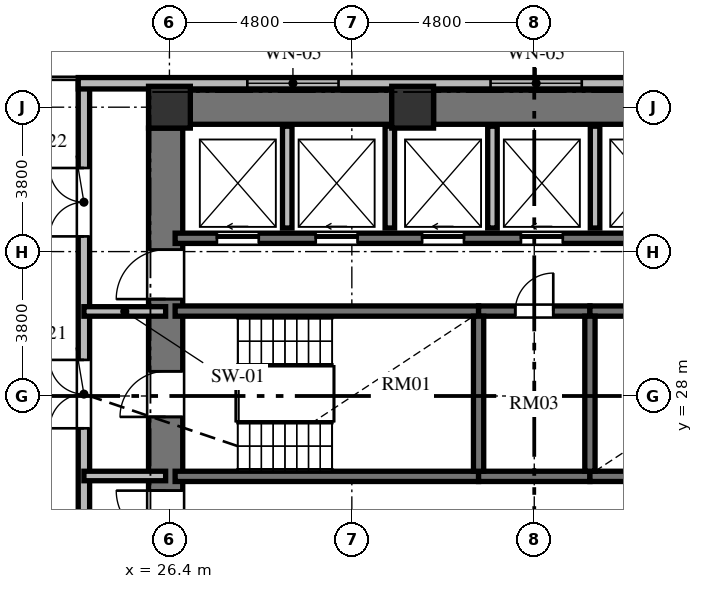
"""IFC4 building model, lengths in metres.
Left out: names, types, materials, properties, quantities, classifications, styles, units other than length and angle.
Written with IfcOpenShell. Run it as: python <this file> out.ifc"""

import sys

from ifc_helpers import new_model, si_unit, direction, frame, frame_2d, origin, origin_2d, place, context, subcontext, project, spatial, rectangle, extrude, element, fill, save


model = new_model("IFC4")
c1 = context("Model", 3, precision=1e-05, world=origin(), true_north=direction((0.0, 1.0)))
c2 = subcontext(c1, "Body", "Model", "MODEL_VIEW")
j1 = project(units=[si_unit("LENGTHUNIT", "METRE"), si_unit("PLANEANGLEUNIT", "RADIAN")], contexts=[c1])
p1 = place(None, origin())
s1 = spatial("IfcSite", under=j1, at=p1, CompositionType="ELEMENT")
p2 = place(p1, origin())
s2 = spatial("IfcBuilding", under=s1, at=p2, CompositionType="ELEMENT")
p3 = place(p2, origin())
s3 = spatial("IfcBuildingStorey", under=s2, at=p3, CompositionType="ELEMENT", Elevation=0.0)
for number, where, z_axis, x_axis in (
    (1, (32.8, 35.6, 0.0), (0.0, 0.0, 1.0), (1.0, 0.0, 0.0)),
    (2, (26.4, 35.6, 0.0), (0.0, 0.0, 1.0), (1.0, 0.0, 0.0)),
):
    element("IfcColumn", number, at=place(p3, frame(where, z_axis=z_axis, x_axis=x_axis)), inside=s3, PredefinedType="COLUMN", context=c2, shape_type="SweptSolid", body=[
        extrude(rectangle(XDim=1.1, YDim=1.1, at=origin_2d()), origin(), (0.0, 0.0, 1.0), 6.0),
    ])
p4 = place(p3, frame((26.3, 20.95, 0.0), z_axis=(0.0, 0.0, 1.0), x_axis=(0.0, 1.0, 0.0)))
e3 = element("IfcWall", 3, at=p4, inside=s3, PredefinedType="SHEAR", context=c2, shape_type="SweptSolid", body=[
    extrude(rectangle(XDim=14.1, YDim=0.9, at=frame_2d((7.05, 0.0))), origin(), (0.0, 0.0, 1.0), 6.0),
])
p5 = place(p4, frame((6.5, 0.0, 0.0)))
e4 = element("IfcOpeningElement", 4, at=p5, cuts=e3, PredefinedType="OPENING", context=c2, shape_type="SweptSolid", body=[
    extrude(rectangle(XDim=1.2, YDim=2.15, at=frame_2d((0.6, 1.075))), frame((0.0, 0.46, 0.0), z_axis=(0.0, -1.0, 0.0), x_axis=(1.0, 0.0, 0.0)), (0.0, 0.0, 1.0), 0.92),
])
p6 = place(p4, frame((9.6, 0.0, 0.0)))
e5 = element("IfcOpeningElement", 5, at=p6, cuts=e3, PredefinedType="OPENING", context=c2, shape_type="SweptSolid", body=[
    extrude(rectangle(XDim=1.3, YDim=2.2, at=frame_2d((0.65, 1.1))), frame((0.0, 0.46, 0.0), z_axis=(0.0, -1.0, 0.0), x_axis=(1.0, 0.0, 0.0)), (0.0, 0.0, 1.0), 0.92),
])
p7 = place(p4, frame((3.26, 0.0, 0.0)))
e6 = element("IfcOpeningElement", 6, at=p7, cuts=e3, PredefinedType="OPENING", context=c2, shape_type="SweptSolid", body=[
    extrude(rectangle(XDim=1.3, YDim=2.2, at=frame_2d((0.65, 1.1))), frame((0.0, 0.46, 0.0), z_axis=(0.0, -1.0, 0.0), x_axis=(1.0, 0.0, 0.0)), (0.0, 0.0, 1.0), 0.92),
])
p8 = place(p3, frame((26.95, 35.6, 0.0), z_axis=(0.0, 0.0, 1.0), x_axis=(1.0, 0.0, 0.0)))
e7 = element("IfcWall", 7, at=p8, inside=s3, PredefinedType="SHEAR", context=c2, shape_type="SweptSolid", body=[
    extrude(rectangle(XDim=5.3, YDim=0.9, at=frame_2d((2.65, 0.0))), origin(), (0.0, 0.0, 1.0), 6.0),
])
p9 = place(p3, frame((33.35, 35.6, 0.0), z_axis=(0.0, 0.0, 1.0), x_axis=(1.0, 0.0, 0.0)))
e8 = element("IfcWall", 8, at=p9, inside=s3, PredefinedType="SHEAR", context=c2, shape_type="SweptSolid", body=[
    extrude(rectangle(XDim=5.3, YDim=0.9, at=frame_2d((2.65, 0.0))), origin(), (0.0, 0.0, 1.0), 6.0),
])
p10 = place(p3, frame((24.15, 13.75, 0.0), z_axis=(0.0, 0.0, 1.0), x_axis=(0.0, 1.0, 0.0)))
e9 = element("IfcWall", 9, at=p10, inside=s3, PredefinedType="SOLIDWALL", context=c2, shape_type="SweptSolid", body=[
    extrude(rectangle(XDim=22.48, YDim=0.3, at=frame_2d((11.24, 0.0))), origin(), (0.0, 0.0, 1.0), 5.72),
])
p11 = place(p10, frame((8.15, 0.0, 0.0)))
e10 = element("IfcOpeningElement", 10, at=p11, cuts=e9, PredefinedType="OPENING", context=c2, shape_type="SweptSolid", body=[
    extrude(rectangle(XDim=1.8, YDim=2.4, at=frame_2d((0.9, 1.2))), frame((0.0, 0.16, 0.0), z_axis=(0.0, -1.0, 0.0), x_axis=(1.0, 0.0, 0.0)), (0.0, 0.0, 1.0), 0.32),
])
p12 = place(p10, frame((13.4, 0.0, 0.0)))
e11 = element("IfcOpeningElement", 11, at=p12, cuts=e9, PredefinedType="OPENING", context=c2, shape_type="SweptSolid", body=[
    extrude(rectangle(XDim=1.8, YDim=2.4, at=frame_2d((0.9, 1.2))), frame((0.0, 0.16, 0.0), z_axis=(0.0, -1.0, 0.0), x_axis=(1.0, 0.0, 0.0)), (0.0, 0.0, 1.0), 0.32),
])
p13 = place(p10, frame((18.45, 0.0, 0.0)))
e12 = element("IfcOpeningElement", 12, at=p13, cuts=e9, PredefinedType="OPENING", context=c2, shape_type="SweptSolid", body=[
    extrude(rectangle(XDim=1.8, YDim=2.4, at=frame_2d((0.9, 1.2))), frame((0.0, 0.16, 0.0), z_axis=(0.0, -1.0, 0.0), x_axis=(1.0, 0.0, 0.0)), (0.0, 0.0, 1.0), 0.32),
])
p14 = place(p3, frame((24.0, 36.23, 0.0), z_axis=(0.0, 0.0, 1.0), x_axis=(1.0, 0.0, 0.0)))
e13 = element("IfcWall", 13, at=p14, inside=s3, PredefinedType="SOLIDWALL", context=c2, shape_type="SweptSolid", body=[
    extrude(rectangle(XDim=21.95, YDim=0.3, at=frame_2d((10.975, 0.0))), origin(), (0.0, 0.0, 1.0), 5.72),
])
p15 = place(p14, frame((4.45, 0.0, 0.9)))
e14 = element("IfcOpeningElement", 14, at=p15, cuts=e13, PredefinedType="OPENING", context=c2, shape_type="SweptSolid", body=[
    extrude(rectangle(XDim=2.4, YDim=3.0, at=frame_2d((1.2, 1.5))), frame((0.0, 0.16, 0.0), z_axis=(0.0, -1.0, 0.0), x_axis=(1.0, 0.0, 0.0)), (0.0, 0.0, 1.0), 0.32),
])
p16 = place(p14, frame((10.85, 0.0, 0.9)))
e15 = element("IfcOpeningElement", 15, at=p16, cuts=e13, PredefinedType="OPENING", context=c2, shape_type="SweptSolid", body=[
    extrude(rectangle(XDim=2.4, YDim=3.0, at=frame_2d((1.2, 1.5))), frame((0.0, 0.16, 0.0), z_axis=(0.0, -1.0, 0.0), x_axis=(1.0, 0.0, 0.0)), (0.0, 0.0, 1.0), 0.32),
])
p17 = place(p14, frame((17.25, 0.0, 0.9)))
e16 = element("IfcOpeningElement", 16, at=p17, cuts=e13, PredefinedType="OPENING", context=c2, shape_type="SweptSolid", body=[
    extrude(rectangle(XDim=2.4, YDim=3.0, at=frame_2d((1.2, 1.5))), frame((0.0, 0.16, 0.0), z_axis=(0.0, -1.0, 0.0), x_axis=(1.0, 0.0, 0.0)), (0.0, 0.0, 1.0), 0.32),
])
p18 = place(p3, frame((26.55, 30.235, 0.0), z_axis=(0.0, 0.0, 1.0), x_axis=(1.0, 0.0, 0.0)))
e17 = element("IfcWall", 17, at=p18, inside=s3, PredefinedType="SHEAR", context=c2, shape_type="SweptSolid", body=[
    extrude(rectangle(XDim=7.985, YDim=0.27, at=frame_2d((3.992, 0.0))), origin(), (0.0, 0.0, 1.0), 6.0),
])
p19 = place(p3, frame((34.535, 30.235, 0.0), z_axis=(0.0, 0.0, 1.0), x_axis=(1.0, 0.0, 0.0)))
e18 = element("IfcWall", 18, at=p19, inside=s3, PredefinedType="SHEAR", context=c2, shape_type="SweptSolid", body=[
    extrude(rectangle(XDim=2.93, YDim=0.27, at=frame_2d((1.465, 0.0))), origin(), (0.0, 0.0, 1.0), 6.0),
])
p20 = place(p19, frame((0.965, 0.0, 0.0)))
e19 = element("IfcOpeningElement", 19, at=p20, cuts=e18, PredefinedType="OPENING", context=c2, shape_type="SweptSolid", body=[
    extrude(rectangle(XDim=1.0, YDim=2.1, at=frame_2d((0.5, 1.05))), frame((0.0, 0.145, 0.0), z_axis=(0.0, -1.0, 0.0), x_axis=(1.0, 0.0, 0.0)), (0.0, 0.0, 1.0), 0.29),
])
p21 = place(p3, frame((37.465, 30.235, 0.0), z_axis=(0.0, 0.0, 1.0), x_axis=(1.0, 0.0, 0.0)))
e20 = element("IfcWall", 20, at=p21, inside=s3, PredefinedType="SHEAR", context=c2, shape_type="SweptSolid", body=[
    extrude(rectangle(XDim=7.985, YDim=0.27, at=frame_2d((3.992, 0.0))), origin(), (0.0, 0.0, 1.0), 6.0),
])
p22 = place(p21, frame((6.455, 0.0, 0.0)))
e21 = element("IfcOpeningElement", 21, at=p22, cuts=e20, PredefinedType="OPENING", context=c2, shape_type="SweptSolid", body=[
    extrude(rectangle(XDim=1.2, YDim=2.15, at=frame_2d((0.6, 1.075))), frame((0.0, 0.145, 0.0), z_axis=(0.0, -1.0, 0.0), x_axis=(1.0, 0.0, 0.0)), (0.0, 0.0, 1.0), 0.29),
])
p23 = place(p3, frame((26.55, 25.885, 0.0), z_axis=(0.0, 0.0, 1.0), x_axis=(1.0, 0.0, 0.0)))
e22 = element("IfcWall", 22, at=p23, inside=s3, PredefinedType="SHEAR", context=c2, shape_type="SweptSolid", body=[
    extrude(rectangle(XDim=7.985, YDim=0.27, at=frame_2d((3.992, 0.0))), origin(), (0.0, 0.0, 1.0), 6.0),
])
p24 = place(p3, frame((34.535, 25.885, 0.0), z_axis=(0.0, 0.0, 1.0), x_axis=(1.0, 0.0, 0.0)))
e23 = element("IfcWall", 23, at=p24, inside=s3, PredefinedType="SHEAR", context=c2, shape_type="SweptSolid", body=[
    extrude(rectangle(XDim=2.93, YDim=0.27, at=frame_2d((1.465, 0.0))), origin(), (0.0, 0.0, 1.0), 6.0),
])
p25 = place(p3, frame((37.465, 25.885, 0.0), z_axis=(0.0, 0.0, 1.0), x_axis=(1.0, 0.0, 0.0)))
e24 = element("IfcWall", 24, at=p25, inside=s3, PredefinedType="SHEAR", context=c2, shape_type="SweptSolid", body=[
    extrude(rectangle(XDim=7.985, YDim=0.27, at=frame_2d((3.992, 0.0))), origin(), (0.0, 0.0, 1.0), 6.0),
])
for number, where, z_axis, x_axis in (
    (25, (34.535, 26.02, 0.0), (0.0, 0.0, 1.0), (0.0, 1.0, 0.0)),
    (26, (37.465, 26.02, 0.0), (0.0, 0.0, 1.0), (0.0, 1.0, 0.0)),
):
    element("IfcWall", number, at=place(p3, frame(where, z_axis=z_axis, x_axis=x_axis)), inside=s3, PredefinedType="SHEAR", context=c2, shape_type="SweptSolid", body=[
        extrude(rectangle(XDim=4.08, YDim=0.27, at=frame_2d((2.04, 0.0))), origin(), (0.0, 0.0, 1.0), 6.0),
    ])
p26 = place(p3, frame((26.55, 32.15, 0.0), z_axis=(0.0, 0.0, 1.0), x_axis=(1.0, 0.0, 0.0)))
e27 = element("IfcWall", 27, at=p26, inside=s3, PredefinedType="SHEAR", context=c2, shape_type="SweptSolid", body=[
    extrude(rectangle(XDim=16.4, YDim=0.27, at=frame_2d((8.2, 0.0))), origin(), (0.0, 0.0, 1.0), 6.0),
])
p27 = place(p26, frame((1.1, 0.0, 0.0)))
e28 = element("IfcOpeningElement", 28, at=p27, cuts=e27, PredefinedType="OPENING", context=c2, shape_type="SweptSolid", body=[
    extrude(rectangle(XDim=1.1, YDim=2.2, at=frame_2d((0.55, 1.1))), frame((0.0, 0.145, 0.0), z_axis=(0.0, -1.0, 0.0), x_axis=(1.0, 0.0, 0.0)), (0.0, 0.0, 1.0), 0.29),
])
p28 = place(p26, frame((3.7, 0.0, 0.0)))
e29 = element("IfcOpeningElement", 29, at=p28, cuts=e27, PredefinedType="OPENING", context=c2, shape_type="SweptSolid", body=[
    extrude(rectangle(XDim=1.1, YDim=2.2, at=frame_2d((0.55, 1.1))), frame((0.0, 0.145, 0.0), z_axis=(0.0, -1.0, 0.0), x_axis=(1.0, 0.0, 0.0)), (0.0, 0.0, 1.0), 0.29),
])
p29 = place(p26, frame((6.5, 0.0, 0.0)))
e30 = element("IfcOpeningElement", 30, at=p29, cuts=e27, PredefinedType="OPENING", context=c2, shape_type="SweptSolid", body=[
    extrude(rectangle(XDim=1.1, YDim=2.2, at=frame_2d((0.55, 1.1))), frame((0.0, 0.145, 0.0), z_axis=(0.0, -1.0, 0.0), x_axis=(1.0, 0.0, 0.0)), (0.0, 0.0, 1.0), 0.29),
])
p30 = place(p26, frame((9.1, 0.0, 0.0)))
e31 = element("IfcOpeningElement", 31, at=p30, cuts=e27, PredefinedType="OPENING", context=c2, shape_type="SweptSolid", body=[
    extrude(rectangle(XDim=1.1, YDim=2.2, at=frame_2d((0.55, 1.1))), frame((0.0, 0.145, 0.0), z_axis=(0.0, -1.0, 0.0), x_axis=(1.0, 0.0, 0.0)), (0.0, 0.0, 1.0), 0.29),
])
p31 = place(p26, frame((11.9, 0.0, 0.0)))
e32 = element("IfcOpeningElement", 32, at=p31, cuts=e27, PredefinedType="OPENING", context=c2, shape_type="SweptSolid", body=[
    extrude(rectangle(XDim=1.1, YDim=2.2, at=frame_2d((0.55, 1.1))), frame((0.0, 0.145, 0.0), z_axis=(0.0, -1.0, 0.0), x_axis=(1.0, 0.0, 0.0)), (0.0, 0.0, 1.0), 0.29),
])
p32 = place(p26, frame((14.5, 0.0, 0.0)))
e33 = element("IfcOpeningElement", 33, at=p32, cuts=e27, PredefinedType="OPENING", context=c2, shape_type="SweptSolid", body=[
    extrude(rectangle(XDim=1.1, YDim=2.2, at=frame_2d((0.55, 1.1))), frame((0.0, 0.145, 0.0), z_axis=(0.0, -1.0, 0.0), x_axis=(1.0, 0.0, 0.0)), (0.0, 0.0, 1.0), 0.29),
])
for number, where, z_axis, x_axis in (
    (34, (29.5, 32.42, 0.0), (0.0, 0.0, 1.0), (0.0, 1.0, 0.0)),
    (35, (32.2, 32.42, 0.0), (0.0, 0.0, 1.0), (0.0, 1.0, 0.0)),
    (36, (34.9, 32.42, 0.0), (0.0, 0.0, 1.0), (0.0, 1.0, 0.0)),
    (37, (37.6, 32.42, 0.0), (0.0, 0.0, 1.0), (0.0, 1.0, 0.0)),
):
    element("IfcWall", number, at=place(p3, frame(where, z_axis=z_axis, x_axis=x_axis)), inside=s3, PredefinedType="SOLIDWALL", context=c2, shape_type="SweptSolid", body=[
        extrude(rectangle(XDim=2.68, YDim=0.25, at=frame_2d((1.34, 0.0))), origin(), (0.0, 0.0, 1.0), 5.72),
    ])
for number, where, z_axis, x_axis in (
    (38, (24.15, 30.225, 0.0), (0.0, 0.0, 1.0), (1.0, 0.0, 0.0)),
    (39, (24.15, 25.895, 0.0), (0.0, 0.0, 1.0), (1.0, 0.0, 0.0)),
):
    element("IfcWall", number, at=place(p3, frame(where, z_axis=z_axis, x_axis=x_axis)), inside=s3, PredefinedType="SOLIDWALL", context=c2, shape_type="SweptSolid", body=[
        extrude(rectangle(XDim=2.15, YDim=0.25, at=frame_2d((1.075, 0.0))), origin(), (0.0, 0.0, 1.0), 5.72),
    ])
p33 = place(p12, origin())
e40 = element("IfcDoor", 40, at=p33, inside=s3, OperationType="DOUBLE_DOOR_SINGLE_SWING", PredefinedType="DOOR", context=c2, shape_type="SweptSolid", body=[
    extrude(rectangle(XDim=1.8, YDim=2.4, at=frame_2d((0.9, 1.2))), frame((0.0, 0.025, 0.0), z_axis=(0.0, -1.0, 0.0), x_axis=(1.0, 0.0, 0.0)), (0.0, 0.0, 1.0), 0.05),
])
fill(e11, e40)
p34 = place(p13, origin())
e41 = element("IfcDoor", 41, at=p34, inside=s3, OperationType="DOUBLE_DOOR_SINGLE_SWING", PredefinedType="DOOR", context=c2, shape_type="SweptSolid", body=[
    extrude(rectangle(XDim=1.8, YDim=2.4, at=frame_2d((0.9, 1.2))), frame((0.0, 0.025, 0.0), z_axis=(0.0, -1.0, 0.0), x_axis=(1.0, 0.0, 0.0)), (0.0, 0.0, 1.0), 0.05),
])
fill(e12, e41)
p35 = place(p15, origin())
e42 = element("IfcWindow", 42, at=p35, inside=s3, PartitioningType="SINGLE_PANEL", PredefinedType="WINDOW", context=c2, shape_type="SweptSolid", body=[
    extrude(rectangle(XDim=2.4, YDim=3.0, at=frame_2d((1.2, 1.5))), frame((0.0, 0.03, 0.0), z_axis=(0.0, -1.0, 0.0), x_axis=(1.0, 0.0, 0.0)), (0.0, 0.0, 1.0), 0.06),
])
fill(e14, e42)
p36 = place(p16, origin())
e43 = element("IfcWindow", 43, at=p36, inside=s3, PartitioningType="SINGLE_PANEL", PredefinedType="WINDOW", context=c2, shape_type="SweptSolid", body=[
    extrude(rectangle(XDim=2.4, YDim=3.0, at=frame_2d((1.2, 1.5))), frame((0.0, 0.03, 0.0), z_axis=(0.0, -1.0, 0.0), x_axis=(1.0, 0.0, 0.0)), (0.0, 0.0, 1.0), 0.06),
])
fill(e15, e43)
p37 = place(p5, origin())
e44 = element("IfcDoor", 44, at=p37, inside=s3, OperationType="SINGLE_SWING_LEFT", PredefinedType="DOOR", context=c2, shape_type="SweptSolid", body=[
    extrude(rectangle(XDim=1.2, YDim=2.15, at=frame_2d((0.6, 1.075))), frame((0.0, 0.025, 0.0), z_axis=(0.0, -1.0, 0.0), x_axis=(1.0, 0.0, 0.0)), (0.0, 0.0, 1.0), 0.05),
])
fill(e4, e44)
p38 = place(p20, origin())
e45 = element("IfcDoor", 45, at=p38, inside=s3, OperationType="SINGLE_SWING_RIGHT", PredefinedType="DOOR", context=c2, shape_type="SweptSolid", body=[
    extrude(rectangle(XDim=1.0, YDim=2.1, at=frame_2d((0.5, 1.05))), frame((0.0, 0.025, 0.0), z_axis=(0.0, -1.0, 0.0), x_axis=(1.0, 0.0, 0.0)), (0.0, 0.0, 1.0), 0.05),
])
fill(e19, e45)
p39 = place(p6, origin())
e46 = element("IfcDoor", 46, at=p39, inside=s3, OperationType="SINGLE_SWING_LEFT", PredefinedType="DOOR", context=c2, shape_type="SweptSolid", body=[
    extrude(rectangle(XDim=1.3, YDim=2.2, at=frame_2d((0.65, 1.1))), frame((0.0, 0.025, 0.0), z_axis=(0.0, -1.0, 0.0), x_axis=(1.0, 0.0, 0.0)), (0.0, 0.0, 1.0), 0.05),
])
fill(e5, e46)
p40 = place(p7, origin())
e47 = element("IfcDoor", 47, at=p40, inside=s3, OperationType="SINGLE_SWING_RIGHT", PredefinedType="DOOR", context=c2, shape_type="SweptSolid", body=[
    extrude(rectangle(XDim=1.3, YDim=2.2, at=frame_2d((0.65, 1.1))), frame((0.0, 0.025, 0.0), z_axis=(0.0, -1.0, 0.0), x_axis=(1.0, 0.0, 0.0)), (0.0, 0.0, 1.0), 0.05),
])
fill(e6, e47)
p41 = place(p27, origin())
e48 = element("IfcDoor", 48, at=p41, inside=s3, OperationType="SLIDING_TO_LEFT", PredefinedType="DOOR", context=c2, shape_type="SweptSolid", body=[
    extrude(rectangle(XDim=1.1, YDim=2.2, at=frame_2d((0.55, 1.1))), frame((0.0, 0.025, 0.0), z_axis=(0.0, -1.0, 0.0), x_axis=(1.0, 0.0, 0.0)), (0.0, 0.0, 1.0), 0.05),
])
fill(e28, e48)
p42 = place(p28, origin())
e49 = element("IfcDoor", 49, at=p42, inside=s3, OperationType="SLIDING_TO_LEFT", PredefinedType="DOOR", context=c2, shape_type="SweptSolid", body=[
    extrude(rectangle(XDim=1.1, YDim=2.2, at=frame_2d((0.55, 1.1))), frame((0.0, 0.025, 0.0), z_axis=(0.0, -1.0, 0.0), x_axis=(1.0, 0.0, 0.0)), (0.0, 0.0, 1.0), 0.05),
])
fill(e29, e49)
p43 = place(p29, origin())
e50 = element("IfcDoor", 50, at=p43, inside=s3, OperationType="SLIDING_TO_LEFT", PredefinedType="DOOR", context=c2, shape_type="SweptSolid", body=[
    extrude(rectangle(XDim=1.1, YDim=2.2, at=frame_2d((0.55, 1.1))), frame((0.0, 0.025, 0.0), z_axis=(0.0, -1.0, 0.0), x_axis=(1.0, 0.0, 0.0)), (0.0, 0.0, 1.0), 0.05),
])
fill(e30, e50)
p44 = place(p30, origin())
e51 = element("IfcDoor", 51, at=p44, inside=s3, OperationType="SLIDING_TO_LEFT", PredefinedType="DOOR", context=c2, shape_type="SweptSolid", body=[
    extrude(rectangle(XDim=1.1, YDim=2.2, at=frame_2d((0.55, 1.1))), frame((0.0, 0.025, 0.0), z_axis=(0.0, -1.0, 0.0), x_axis=(1.0, 0.0, 0.0)), (0.0, 0.0, 1.0), 0.05),
])
fill(e31, e51)
save(model, sys.argv[1])
